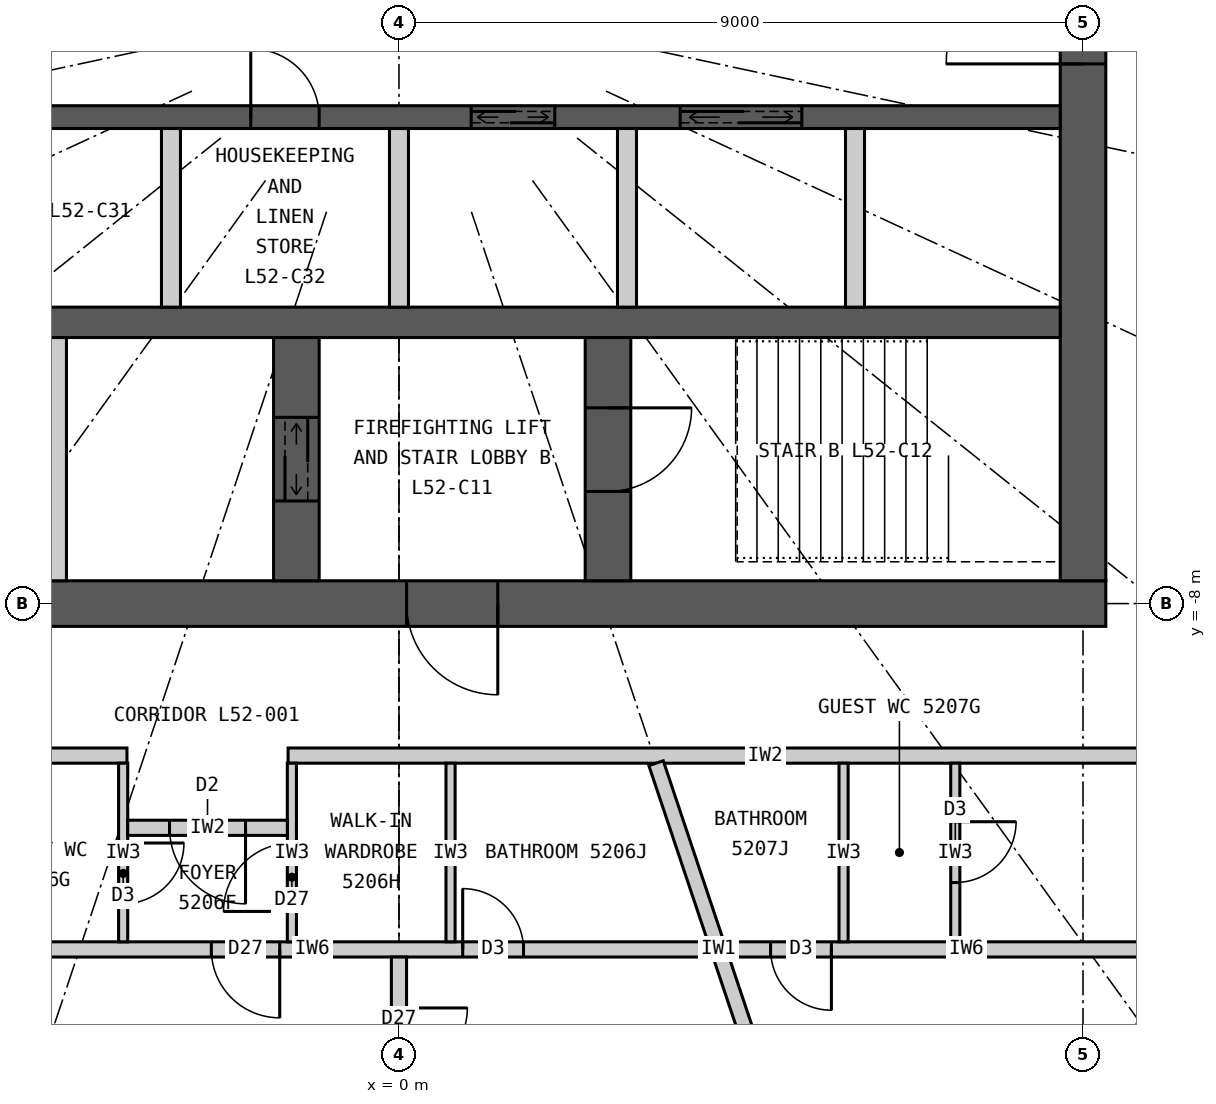
"""IFC4 building model, lengths in metres.
Left out: names, types, materials, properties, quantities, classifications, styles, units other than length and angle.
Written with IfcOpenShell. Run it as: python <this file> out.ifc"""

import sys

from ifc_helpers import new_model, si_unit, direction, frame, frame_2d, origin, origin_2d, place, context, subcontext, project, spatial, rectangle, circle, extrude, element, fill, save


model = new_model("IFC4")
c1 = context("Model", 3, precision=1e-05, world=origin(), true_north=direction((0.0, 1.0)))
c2 = subcontext(c1, "Body", "Model", "MODEL_VIEW")
j1 = project(units=[si_unit("LENGTHUNIT", "METRE"), si_unit("PLANEANGLEUNIT", "RADIAN")], contexts=[c1])
p1 = place(None, origin())
s1 = spatial("IfcSite", under=j1, at=p1, CompositionType="ELEMENT")
p2 = place(p1, origin())
s2 = spatial("IfcBuilding", under=s1, at=p2, CompositionType="ELEMENT")
p3 = place(p2, frame((0.0, 0.0, 196.2)))
s3 = spatial("IfcBuildingStorey", under=s2, at=p3, CompositionType="ELEMENT", Elevation=196.2)
p4 = place(p3, frame((10.019, -13.883, 0.0), z_axis=(0.0, 0.0, 1.0), x_axis=(1.0, 0.0, 0.0)))
e1 = element("IfcColumn", 1, at=p4, inside=s3, PredefinedType="COLUMN", context=c2, shape_type="SweptSolid", body=[
    extrude(circle(Radius=0.45, at=origin_2d()), origin(), (0.0, 0.0, 1.0), 3.3),
])
p5 = place(p3, frame((9.3, -8.0, 0.0), z_axis=(0.0, 0.0, 1.0), x_axis=(-1.0, 0.0, 0.0)))
e2 = element("IfcWall", 2, at=p5, inside=s3, PredefinedType="SHEAR", context=c2, shape_type="SweptSolid", body=[
    extrude(rectangle(XDim=18.6, YDim=0.6, at=frame_2d((9.3, 0.0))), origin(), (0.0, 0.0, 1.0), 3.3),
])
p6 = place(p5, frame((8.0, 0.0, 0.0)))
e3 = element("IfcOpeningElement", 3, at=p6, cuts=e2, PredefinedType="OPENING", context=c2, shape_type="SweptSolid", body=[
    extrude(rectangle(XDim=1.2, YDim=2.2, at=frame_2d((0.6, 1.1))), frame((0.0, 0.31, 0.0), z_axis=(0.0, -1.0, 0.0), x_axis=(1.0, 0.0, 0.0)), (0.0, 0.0, 1.0), 0.62),
])
p7 = place(p5, frame((15.6, 0.0, 0.0)))
e4 = element("IfcOpeningElement", 4, at=p7, cuts=e2, PredefinedType="OPENING", context=c2, shape_type="SweptSolid", body=[
    extrude(rectangle(XDim=0.9, YDim=2.2, at=frame_2d((0.45, 1.1))), frame((0.0, 0.31, 0.0), z_axis=(0.0, -1.0, 0.0), x_axis=(1.0, 0.0, 0.0)), (0.0, 0.0, 1.0), 0.62),
])
p8 = place(p3, frame((9.0, -7.7, 0.0), z_axis=(0.0, 0.0, 1.0), x_axis=(0.0, 1.0, 0.0)))
e5 = element("IfcWall", 5, at=p8, inside=s3, PredefinedType="SHEAR", context=c2, shape_type="SweptSolid", body=[
    extrude(rectangle(XDim=15.4, YDim=0.6, at=frame_2d((7.7, 0.0))), origin(), (0.0, 0.0, 1.0), 3.3),
])
p9 = place(p8, frame((6.8, 0.0, 0.0)))
e6 = element("IfcOpeningElement", 6, at=p9, cuts=e5, PredefinedType="OPENING", context=c2, shape_type="SweptSolid", body=[
    extrude(rectangle(XDim=1.8, YDim=2.2, at=frame_2d((0.9, 1.1))), frame((0.0, 0.31, 0.0), z_axis=(0.0, -1.0, 0.0), x_axis=(1.0, 0.0, 0.0)), (0.0, 0.0, 1.0), 0.62),
])
p10 = place(p3, frame((-8.7, -4.3, 0.0), z_axis=(0.0, 0.0, 1.0), x_axis=(1.0, 0.0, 0.0)))
e7 = element("IfcWall", 7, at=p10, inside=s3, PredefinedType="SHEAR", context=c2, shape_type="SweptSolid", body=[
    extrude(rectangle(XDim=17.4, YDim=0.4, at=frame_2d((8.7, 0.0))), origin(), (0.0, 0.0, 1.0), 3.3),
])
p11 = place(p3, frame((-8.7, -1.6, 0.0), z_axis=(0.0, 0.0, 1.0), x_axis=(1.0, 0.0, 0.0)))
e8 = element("IfcWall", 8, at=p11, inside=s3, PredefinedType="SHEAR", context=c2, shape_type="SweptSolid", body=[
    extrude(rectangle(XDim=17.4, YDim=0.3, at=frame_2d((8.7, 0.0))), origin(), (0.0, 0.0, 1.0), 3.3),
])
p12 = place(p11, frame((9.65, 0.0, 0.0)))
e9 = element("IfcOpeningElement", 9, at=p12, cuts=e8, PredefinedType="OPENING", context=c2, shape_type="SweptSolid", body=[
    extrude(rectangle(XDim=1.1, YDim=2.2, at=frame_2d((0.55, 1.1))), frame((0.0, 0.16, 0.0), z_axis=(0.0, -1.0, 0.0), x_axis=(1.0, 0.0, 0.0)), (0.0, 0.0, 1.0), 0.32),
])
p13 = place(p11, frame((12.4, 0.0, 0.0)))
e10 = element("IfcOpeningElement", 10, at=p13, cuts=e8, PredefinedType="OPENING", context=c2, shape_type="SweptSolid", body=[
    extrude(rectangle(XDim=1.6, YDim=2.4, at=frame_2d((0.8, 1.2))), frame((0.0, 0.16, 0.0), z_axis=(0.0, -1.0, 0.0), x_axis=(1.0, 0.0, 0.0)), (0.0, 0.0, 1.0), 0.32),
])
p14 = place(p11, frame((2.25, 0.0, 0.0)))
e11 = element("IfcOpeningElement", 11, at=p14, cuts=e8, PredefinedType="OPENING", context=c2, shape_type="SweptSolid", body=[
    extrude(rectangle(XDim=0.9, YDim=2.2, at=frame_2d((0.45, 1.1))), frame((0.0, 0.16, 0.0), z_axis=(0.0, -1.0, 0.0), x_axis=(1.0, 0.0, 0.0)), (0.0, 0.0, 1.0), 0.32),
])
p15 = place(p11, frame((6.75, 0.0, 0.0)))
e12 = element("IfcOpeningElement", 12, at=p15, cuts=e8, PredefinedType="OPENING", context=c2, shape_type="SweptSolid", body=[
    extrude(rectangle(XDim=0.9, YDim=2.2, at=frame_2d((0.45, 1.1))), frame((0.0, 0.16, 0.0), z_axis=(0.0, -1.0, 0.0), x_axis=(1.0, 0.0, 0.0)), (0.0, 0.0, 1.0), 0.32),
])
p16 = place(p3, frame((2.75, -7.7, 0.0), z_axis=(0.0, 0.0, 1.0), x_axis=(0.0, 1.0, 0.0)))
e13 = element("IfcWall", 13, at=p16, inside=s3, PredefinedType="SHEAR", context=c2, shape_type="SweptSolid", body=[
    extrude(rectangle(XDim=3.2, YDim=0.6, at=frame_2d((1.6, 0.0))), origin(), (0.0, 0.0, 1.0), 3.3),
])
p17 = place(p16, frame((1.175, 0.0, 0.0)))
e14 = element("IfcOpeningElement", 14, at=p17, cuts=e13, PredefinedType="OPENING", context=c2, shape_type="SweptSolid", body=[
    extrude(rectangle(XDim=1.1, YDim=2.2, at=frame_2d((0.55, 1.1))), frame((0.0, 0.31, 0.0), z_axis=(0.0, -1.0, 0.0), x_axis=(1.0, 0.0, 0.0)), (0.0, 0.0, 1.0), 0.62),
])
p18 = place(p3, frame((-1.35, -7.7, 0.0), z_axis=(0.0, 0.0, 1.0), x_axis=(0.0, 1.0, 0.0)))
e15 = element("IfcWall", 15, at=p18, inside=s3, PredefinedType="SHEAR", context=c2, shape_type="SweptSolid", body=[
    extrude(rectangle(XDim=3.2, YDim=0.6, at=frame_2d((1.6, 0.0))), origin(), (0.0, 0.0, 1.0), 3.3),
])
p19 = place(p18, frame((1.05, 0.0, 0.0)))
e16 = element("IfcOpeningElement", 16, at=p19, cuts=e15, PredefinedType="OPENING", context=c2, shape_type="SweptSolid", body=[
    extrude(rectangle(XDim=1.1, YDim=2.2, at=frame_2d((0.55, 1.1))), frame((0.0, 0.31, 0.0), z_axis=(0.0, -1.0, 0.0), x_axis=(1.0, 0.0, 0.0)), (0.0, 0.0, 1.0), 0.62),
])
p20 = place(p3, frame((-4.5, -7.7, 0.0), z_axis=(0.0, 0.0, 1.0), x_axis=(0.0, 1.0, 0.0)))
e17 = element("IfcWall", 17, at=p20, inside=s3, PredefinedType="PARTITIONING", context=c2, shape_type="SweptSolid", body=[
    extrude(rectangle(XDim=3.2, YDim=0.25, at=frame_2d((1.6, 0.0))), origin(), (0.0, 0.0, 1.0), 3.3),
])
for number, where, z_axis, x_axis in (
    (18, (-3.0, -4.1, 0.0), (0.0, 0.0, 1.0), (0.0, 1.0, 0.0)),
    (19, (0.0, -4.1, 0.0), (0.0, 0.0, 1.0), (0.0, 1.0, 0.0)),
    (20, (3.0, -4.1, 0.0), (0.0, 0.0, 1.0), (0.0, 1.0, 0.0)),
    (21, (6.0, -4.1, 0.0), (0.0, 0.0, 1.0), (0.0, 1.0, 0.0)),
):
    element("IfcWall", number, at=place(p3, frame(where, z_axis=z_axis, x_axis=x_axis)), inside=s3, PredefinedType="PARTITIONING", context=c2, shape_type="SweptSolid", body=[
        extrude(rectangle(XDim=2.35, YDim=0.25, at=frame_2d((1.175, 0.0))), origin(), (0.0, 0.0, 1.0), 3.3),
    ])
p21 = place(p3, frame((11.1, -10.0, 0.0), z_axis=(0.0, 0.0, 1.0), x_axis=(-1.0, 0.0, 0.0)))
e22 = element("IfcWall", 22, at=p21, inside=s3, PredefinedType="PARTITIONING", context=c2, shape_type="SweptSolid", body=[
    extrude(rectangle(XDim=12.559, YDim=0.2, at=frame_2d((6.28, 0.0))), origin(), (0.0, 0.0, 1.0), 3.12),
])
p22 = place(p3, frame((-3.579, -10.0, 0.0), z_axis=(0.0, 0.0, 1.0), x_axis=(-1.0, 0.0, 0.0)))
e23 = element("IfcWall", 23, at=p22, inside=s3, PredefinedType="PARTITIONING", context=c2, shape_type="SweptSolid", body=[
    extrude(rectangle(XDim=7.521, YDim=0.2, at=frame_2d((3.761, 0.0))), origin(), (0.0, 0.0, 1.0), 3.12),
])
p23 = place(p22, frame((6.206, 0.0, 0.0)))
e24 = element("IfcOpeningElement", 24, at=p23, cuts=e23, PredefinedType="OPENING", context=c2, shape_type="SweptSolid", body=[
    extrude(rectangle(XDim=1.0, YDim=2.2, at=frame_2d((0.5, 1.1))), frame((0.0, 0.11, 0.0), z_axis=(0.0, -1.0, 0.0), x_axis=(1.0, 0.0, 0.0)), (0.0, 0.0, 1.0), 0.22),
])
p24 = place(p3, frame((3.383, -10.1, 0.0), z_axis=(0.0, 0.0, 1.0), x_axis=(0.317602151035, -0.948224063003, 0.0)))
e25 = element("IfcWall", 25, at=p24, inside=s3, PredefinedType="PARTITIONING", context=c2, shape_type="SweptSolid", body=[
    extrude(rectangle(XDim=5.168, YDim=0.2, at=frame_2d((2.584, 0.0))), origin(), (0.0, 0.0, 1.0), 2.42),
])
p25 = place(p3, frame((-6.364, -12.55, 0.0), z_axis=(0.0, 0.0, 1.0), x_axis=(1.0, 0.0, 0.0)))
e26 = element("IfcWall", 26, at=p25, inside=s3, PredefinedType="PARTITIONING", context=c2, shape_type="SweptSolid", body=[
    extrude(rectangle(XDim=10.446, YDim=0.2, at=frame_2d((5.223, 0.0))), origin(), (0.0, 0.0, 1.0), 3.12),
])
p26 = place(p25, frame((7.202, 0.0, 0.0)))
e27 = element("IfcOpeningElement", 27, at=p26, cuts=e26, PredefinedType="OPENING", context=c2, shape_type="SweptSolid", body=[
    extrude(rectangle(XDim=0.8, YDim=2.1, at=frame_2d((0.4, 1.05))), frame((0.0, 0.11, 0.0), z_axis=(0.0, -1.0, 0.0), x_axis=(1.0, 0.0, 0.0)), (0.0, 0.0, 1.0), 0.22),
])
p27 = place(p25, frame((3.895, 0.0, 0.0)))
e28 = element("IfcOpeningElement", 28, at=p27, cuts=e26, PredefinedType="OPENING", context=c2, shape_type="SweptSolid", body=[
    extrude(rectangle(XDim=0.9, YDim=2.1, at=frame_2d((0.45, 1.05))), frame((0.0, 0.11, 0.0), z_axis=(0.0, -1.0, 0.0), x_axis=(1.0, 0.0, 0.0)), (0.0, 0.0, 1.0), 0.22),
])
p28 = place(p3, frame((0.0, -12.65, 0.0), z_axis=(0.0, 0.0, 1.0), x_axis=(0.0, -1.0, 0.0)))
e29 = element("IfcWall", 29, at=p28, inside=s3, PredefinedType="PARTITIONING", context=c2, shape_type="SweptSolid", body=[
    extrude(rectangle(XDim=2.85, YDim=0.2, at=frame_2d((1.425, 0.0))), origin(), (0.0, 0.0, 1.0), 2.42),
])
p29 = place(p28, frame((0.67, 0.0, 0.0)))
e30 = element("IfcOpeningElement", 30, at=p29, cuts=e29, PredefinedType="OPENING", context=c2, shape_type="SweptSolid", body=[
    extrude(rectangle(XDim=0.9, YDim=2.1, at=frame_2d((0.45, 1.05))), frame((0.0, 0.11, 0.0), z_axis=(0.0, -1.0, 0.0), x_axis=(1.0, 0.0, 0.0)), (0.0, 0.0, 1.0), 0.22),
])
p30 = place(p3, frame((-3.629, -10.1, 0.0), z_axis=(0.0, 0.0, 1.0), x_axis=(0.0, -1.0, 0.0)))
e31 = element("IfcWall", 31, at=p30, inside=s3, PredefinedType="PARTITIONING", context=c2, shape_type="SweptSolid", body=[
    extrude(rectangle(XDim=2.35, YDim=0.12, at=frame_2d((1.175, 0.0))), origin(), (0.0, 0.0, 1.0), 3.12),
])
p31 = place(p30, frame((1.05, 0.0, 0.0)))
e32 = element("IfcOpeningElement", 32, at=p31, cuts=e31, PredefinedType="OPENING", context=c2, shape_type="SweptSolid", body=[
    extrude(rectangle(XDim=0.8, YDim=2.1, at=frame_2d((0.4, 1.05))), frame((0.0, 0.07, 0.0), z_axis=(0.0, -1.0, 0.0), x_axis=(1.0, 0.0, 0.0)), (0.0, 0.0, 1.0), 0.14),
])
p32 = place(p3, frame((-1.409, -10.1, 0.0), z_axis=(0.0, 0.0, 1.0), x_axis=(0.0, -1.0, 0.0)))
e33 = element("IfcWall", 33, at=p32, inside=s3, PredefinedType="PARTITIONING", context=c2, shape_type="SweptSolid", body=[
    extrude(rectangle(XDim=2.35, YDim=0.12, at=frame_2d((1.175, 0.0))), origin(), (0.0, 0.0, 1.0), 3.12),
])
p33 = place(p32, frame((1.05, 0.0, 0.0)))
e34 = element("IfcOpeningElement", 34, at=p33, cuts=e33, PredefinedType="OPENING", context=c2, shape_type="SweptSolid", body=[
    extrude(rectangle(XDim=0.9, YDim=2.1, at=frame_2d((0.45, 1.05))), frame((0.0, 0.07, 0.0), z_axis=(0.0, -1.0, 0.0), x_axis=(1.0, 0.0, 0.0)), (0.0, 0.0, 1.0), 0.14),
])
p34 = place(p3, frame((0.678, -10.1, 0.0), z_axis=(0.0, 0.0, 1.0), x_axis=(0.0, -1.0, 0.0)))
e35 = element("IfcWall", 35, at=p34, inside=s3, PredefinedType="PARTITIONING", context=c2, shape_type="SweptSolid", body=[
    extrude(rectangle(XDim=2.35, YDim=0.12, at=frame_2d((1.175, 0.0))), origin(), (0.0, 0.0, 1.0), 3.12),
])
p35 = place(p3, frame((-3.569, -10.95, 0.0), z_axis=(0.0, 0.0, 1.0), x_axis=(1.0, 0.0, 0.0)))
e36 = element("IfcWall", 36, at=p35, inside=s3, PredefinedType="PARTITIONING", context=c2, shape_type="SweptSolid", body=[
    extrude(rectangle(XDim=2.1, YDim=0.2, at=frame_2d((1.05, 0.0))), origin(), (0.0, 0.0, 1.0), 3.12),
])
p36 = place(p35, frame((0.55, 0.0, 0.0)))
e37 = element("IfcOpeningElement", 37, at=p36, cuts=e36, PredefinedType="OPENING", context=c2, shape_type="SweptSolid", body=[
    extrude(rectangle(XDim=1.0, YDim=2.2, at=frame_2d((0.5, 1.1))), frame((0.0, 0.11, 0.0), z_axis=(0.0, -1.0, 0.0), x_axis=(1.0, 0.0, 0.0)), (0.0, 0.0, 1.0), 0.22),
])
p37 = place(p3, frame((4.325, -12.55, 0.0), z_axis=(0.0, 0.0, 1.0), x_axis=(1.0, 0.0, 0.0)))
e38 = element("IfcWall", 38, at=p37, inside=s3, PredefinedType="PARTITIONING", context=c2, shape_type="SweptSolid", body=[
    extrude(rectangle(XDim=6.284, YDim=0.2, at=frame_2d((3.142, 0.0))), origin(), (0.0, 0.0, 1.0), 3.12),
])
p38 = place(p37, frame((0.564, 0.0, 0.0)))
e39 = element("IfcOpeningElement", 39, at=p38, cuts=e38, PredefinedType="OPENING", context=c2, shape_type="SweptSolid", body=[
    extrude(rectangle(XDim=0.8, YDim=2.1, at=frame_2d((0.4, 1.05))), frame((0.0, 0.11, 0.0), z_axis=(0.0, -1.0, 0.0), x_axis=(1.0, 0.0, 0.0)), (0.0, 0.0, 1.0), 0.22),
])
p39 = place(p3, frame((5.849, -10.1, 0.0), z_axis=(0.0, 0.0, 1.0), x_axis=(0.0, -1.0, 0.0)))
e40 = element("IfcWall", 40, at=p39, inside=s3, PredefinedType="PARTITIONING", context=c2, shape_type="SweptSolid", body=[
    extrude(rectangle(XDim=2.35, YDim=0.12, at=frame_2d((1.175, 0.0))), origin(), (0.0, 0.0, 1.0), 3.12),
])
p40 = place(p3, frame((7.319, -10.1, 0.0), z_axis=(0.0, 0.0, 1.0), x_axis=(0.0, -1.0, 0.0)))
e41 = element("IfcWall", 41, at=p40, inside=s3, PredefinedType="PARTITIONING", context=c2, shape_type="SweptSolid", body=[
    extrude(rectangle(XDim=2.35, YDim=0.12, at=frame_2d((1.175, 0.0))), origin(), (0.0, 0.0, 1.0), 3.12),
])
p41 = place(p40, frame((0.77, 0.0, 0.0)))
e42 = element("IfcOpeningElement", 42, at=p41, cuts=e41, PredefinedType="OPENING", context=c2, shape_type="SweptSolid", body=[
    extrude(rectangle(XDim=0.8, YDim=2.1, at=frame_2d((0.4, 1.05))), frame((0.0, 0.07, 0.0), z_axis=(0.0, -1.0, 0.0), x_axis=(1.0, 0.0, 0.0)), (0.0, 0.0, 1.0), 0.14),
])
p42 = place(p36, origin())
e43 = element("IfcDoor", 43, at=p42, inside=s3, OperationType="SINGLE_SWING_RIGHT", PredefinedType="DOOR", context=c2, shape_type="SweptSolid", body=[
    extrude(rectangle(XDim=1.0, YDim=2.2, at=frame_2d((0.5, 1.1))), frame((0.0, 0.025, 0.0), z_axis=(0.0, -1.0, 0.0), x_axis=(1.0, 0.0, 0.0)), (0.0, 0.0, 1.0), 0.05),
])
fill(e37, e43)
p43 = place(p31, origin())
e44 = element("IfcDoor", 44, at=p43, inside=s3, OperationType="SINGLE_SWING_LEFT", PredefinedType="DOOR", context=c2, shape_type="SweptSolid", body=[
    extrude(rectangle(XDim=0.8, YDim=2.1, at=frame_2d((0.4, 1.05))), frame((0.0, 0.025, 0.0), z_axis=(0.0, -1.0, 0.0), x_axis=(1.0, 0.0, 0.0)), (0.0, 0.0, 1.0), 0.05),
])
fill(e32, e44)
p44 = place(p33, origin())
e45 = element("IfcDoor", 45, at=p44, inside=s3, OperationType="SINGLE_SWING_RIGHT", PredefinedType="DOOR", context=c2, shape_type="SweptSolid", body=[
    extrude(rectangle(XDim=0.9, YDim=2.1, at=frame_2d((0.45, 1.05))), frame((0.0, 0.025, 0.0), z_axis=(0.0, -1.0, 0.0), x_axis=(1.0, 0.0, 0.0)), (0.0, 0.0, 1.0), 0.05),
])
fill(e34, e45)
p45 = place(p26, origin())
e46 = element("IfcDoor", 46, at=p45, inside=s3, OperationType="SINGLE_SWING_LEFT", PredefinedType="DOOR", context=c2, shape_type="SweptSolid", body=[
    extrude(rectangle(XDim=0.8, YDim=2.1, at=frame_2d((0.4, 1.05))), frame((0.0, 0.025, 0.0), z_axis=(0.0, -1.0, 0.0), x_axis=(1.0, 0.0, 0.0)), (0.0, 0.0, 1.0), 0.05),
])
fill(e27, e46)
p46 = place(p27, origin())
e47 = element("IfcDoor", 47, at=p46, inside=s3, OperationType="SINGLE_SWING_RIGHT", PredefinedType="DOOR", context=c2, shape_type="SweptSolid", body=[
    extrude(rectangle(XDim=0.9, YDim=2.1, at=frame_2d((0.45, 1.05))), frame((0.0, 0.025, 0.0), z_axis=(0.0, -1.0, 0.0), x_axis=(1.0, 0.0, 0.0)), (0.0, 0.0, 1.0), 0.05),
])
fill(e28, e47)
p47 = place(p29, origin())
e48 = element("IfcDoor", 48, at=p47, inside=s3, OperationType="SINGLE_SWING_LEFT", PredefinedType="DOOR", context=c2, shape_type="SweptSolid", body=[
    extrude(rectangle(XDim=0.9, YDim=2.1, at=frame_2d((0.45, 1.05))), frame((0.0, 0.025, 0.0), z_axis=(0.0, -1.0, 0.0), x_axis=(1.0, 0.0, 0.0)), (0.0, 0.0, 1.0), 0.05),
])
fill(e30, e48)
p48 = place(p38, origin())
e49 = element("IfcDoor", 49, at=p48, inside=s3, OperationType="SINGLE_SWING_RIGHT", PredefinedType="DOOR", context=c2, shape_type="SweptSolid", body=[
    extrude(rectangle(XDim=0.8, YDim=2.1, at=frame_2d((0.4, 1.05))), frame((0.0, 0.025, 0.0), z_axis=(0.0, -1.0, 0.0), x_axis=(1.0, 0.0, 0.0)), (0.0, 0.0, 1.0), 0.05),
])
fill(e39, e49)
p49 = place(p41, origin())
e50 = element("IfcDoor", 50, at=p49, inside=s3, OperationType="SINGLE_SWING_LEFT", PredefinedType="DOOR", context=c2, shape_type="SweptSolid", body=[
    extrude(rectangle(XDim=0.8, YDim=2.1, at=frame_2d((0.4, 1.05))), frame((0.0, 0.025, 0.0), z_axis=(0.0, -1.0, 0.0), x_axis=(1.0, 0.0, 0.0)), (0.0, 0.0, 1.0), 0.05),
])
fill(e42, e50)
p50 = place(p6, origin())
e51 = element("IfcDoor", 51, at=p50, inside=s3, OperationType="SINGLE_SWING_LEFT", PredefinedType="DOOR", context=c2, shape_type="SweptSolid", body=[
    extrude(rectangle(XDim=1.2, YDim=2.2, at=frame_2d((0.6, 1.1))), frame((0.0, 0.025, 0.0), z_axis=(0.0, -1.0, 0.0), x_axis=(1.0, 0.0, 0.0)), (0.0, 0.0, 1.0), 0.05),
])
fill(e3, e51)
p51 = place(p17, origin())
e52 = element("IfcDoor", 52, at=p51, inside=s3, OperationType="SINGLE_SWING_RIGHT", PredefinedType="DOOR", context=c2, shape_type="SweptSolid", body=[
    extrude(rectangle(XDim=1.1, YDim=2.2, at=frame_2d((0.55, 1.1))), frame((0.0, 0.025, 0.0), z_axis=(0.0, -1.0, 0.0), x_axis=(1.0, 0.0, 0.0)), (0.0, 0.0, 1.0), 0.05),
])
fill(e14, e52)
p52 = place(p19, origin())
e53 = element("IfcDoor", 53, at=p52, inside=s3, OperationType="DOUBLE_DOOR_SLIDING", PredefinedType="DOOR", context=c2, shape_type="SweptSolid", body=[
    extrude(rectangle(XDim=1.1, YDim=2.2, at=frame_2d((0.55, 1.1))), frame((0.0, 0.025, 0.0), z_axis=(0.0, -1.0, 0.0), x_axis=(1.0, 0.0, 0.0)), (0.0, 0.0, 1.0), 0.05),
])
fill(e16, e53)
p53 = place(p12, origin())
e54 = element("IfcDoor", 54, at=p53, inside=s3, OperationType="DOUBLE_DOOR_SLIDING", PredefinedType="DOOR", context=c2, shape_type="SweptSolid", body=[
    extrude(rectangle(XDim=1.1, YDim=2.2, at=frame_2d((0.55, 1.1))), frame((0.0, 0.025, 0.0), z_axis=(0.0, -1.0, 0.0), x_axis=(1.0, 0.0, 0.0)), (0.0, 0.0, 1.0), 0.05),
])
fill(e9, e54)
p54 = place(p13, origin())
e55 = element("IfcDoor", 55, at=p54, inside=s3, OperationType="DOUBLE_DOOR_SLIDING", PredefinedType="DOOR", context=c2, shape_type="SweptSolid", body=[
    extrude(rectangle(XDim=1.6, YDim=2.4, at=frame_2d((0.8, 1.2))), frame((0.0, 0.025, 0.0), z_axis=(0.0, -1.0, 0.0), x_axis=(1.0, 0.0, 0.0)), (0.0, 0.0, 1.0), 0.05),
])
fill(e10, e55)
p55 = place(p15, origin())
e56 = element("IfcDoor", 56, at=p55, inside=s3, OperationType="SINGLE_SWING_LEFT", PredefinedType="DOOR", context=c2, shape_type="SweptSolid", body=[
    extrude(rectangle(XDim=0.9, YDim=2.2, at=frame_2d((0.45, 1.1))), frame((0.0, 0.025, 0.0), z_axis=(0.0, -1.0, 0.0), x_axis=(1.0, 0.0, 0.0)), (0.0, 0.0, 1.0), 0.05),
])
fill(e12, e56)
p56 = place(p9, origin())
e57 = element("IfcDoor", 57, at=p56, inside=s3, OperationType="DOUBLE_DOOR_DOUBLE_SWING", PredefinedType="DOOR", context=c2, shape_type="SweptSolid", body=[
    extrude(rectangle(XDim=1.8, YDim=2.2, at=frame_2d((0.9, 1.1))), frame((0.0, 0.025, 0.0), z_axis=(0.0, -1.0, 0.0), x_axis=(1.0, 0.0, 0.0)), (0.0, 0.0, 1.0), 0.05),
])
fill(e6, e57)
save(model, sys.argv[1])
